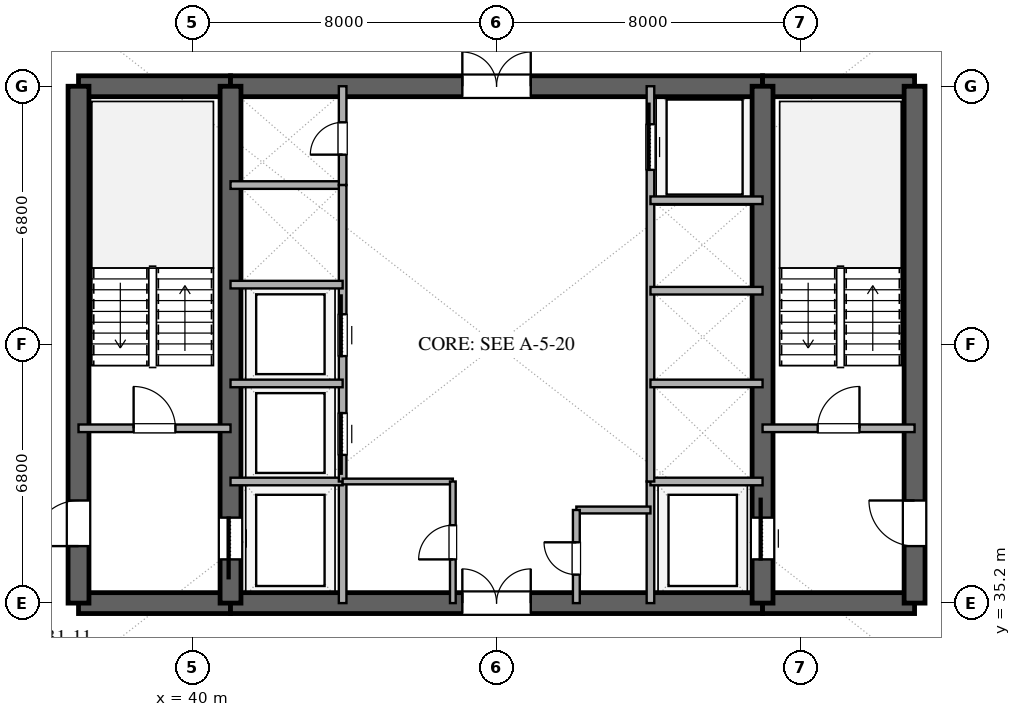
"""IFC4 building model, lengths in metres.
Left out: names, types, materials, properties, quantities, classifications, styles, units other than length and angle.
Written with IfcOpenShell. Run it as: python <this file> out.ifc"""

import sys

from ifc_helpers import new_model, si_unit, direction, frame, frame_2d, origin, place, context, subcontext, project, spatial, rectangle, extrude, element, fill, save


model = new_model("IFC4")
c1 = context("Model", 3, precision=1e-05, world=origin(), true_north=direction((0.0, 1.0)))
c2 = subcontext(c1, "Body", "Model", "MODEL_VIEW")
j1 = project(units=[si_unit("LENGTHUNIT", "METRE"), si_unit("PLANEANGLEUNIT", "RADIAN")], contexts=[c1])
p1 = place(None, origin())
s1 = spatial("IfcSite", under=j1, at=p1, CompositionType="ELEMENT")
p2 = place(p1, origin())
s2 = spatial("IfcBuilding", under=s1, at=p2, CompositionType="ELEMENT")
p3 = place(p2, frame((0.0, 0.0, 123.6)))
s3 = spatial("IfcBuildingStorey", under=s2, at=p3, CompositionType="ELEMENT", Elevation=123.6)
p4 = place(p3, frame((37.0, 35.2, 0.0), z_axis=(0.0, 0.0, 1.0), x_axis=(1.0, 0.0, 0.0)))
e1 = element("IfcWall", 1, at=p4, inside=s3, PredefinedType="SHEAR", context=c2, shape_type="SweptSolid", body=[
    extrude(rectangle(XDim=4.0, YDim=0.55, at=frame_2d((2.0, 0.0))), origin(), (0.0, 0.0, 1.0), 3.38),
])
p5 = place(p3, frame((41.0, 35.2, 0.0), z_axis=(0.0, 0.0, 1.0), x_axis=(1.0, 0.0, 0.0)))
e2 = element("IfcWall", 2, at=p5, inside=s3, PredefinedType="SHEAR", context=c2, shape_type="SweptSolid", body=[
    extrude(rectangle(XDim=14.0, YDim=0.55, at=frame_2d((7.0, 0.0))), origin(), (0.0, 0.0, 1.0), 3.38),
])
p6 = place(p5, frame((6.1, 0.0, 0.0)))
e3 = element("IfcOpeningElement", 3, at=p6, cuts=e2, PredefinedType="OPENING", context=c2, shape_type="SweptSolid", body=[
    extrude(rectangle(XDim=1.8, YDim=2.25, at=frame_2d((0.9, 1.125))), frame((0.0, 0.285, 0.0), z_axis=(0.0, -1.0, 0.0), x_axis=(1.0, 0.0, 0.0)), (0.0, 0.0, 1.0), 0.57),
])
for number, where, z_axis, x_axis in (
    (4, (55.0, 35.2, 0.0), (0.0, 0.0, 1.0), (1.0, 0.0, 0.0)),
    (5, (37.0, 48.8, 0.0), (0.0, 0.0, 1.0), (1.0, 0.0, 0.0)),
):
    element("IfcWall", number, at=place(p3, frame(where, z_axis=z_axis, x_axis=x_axis)), inside=s3, PredefinedType="SHEAR", context=c2, shape_type="SweptSolid", body=[
        extrude(rectangle(XDim=4.0, YDim=0.55, at=frame_2d((2.0, 0.0))), origin(), (0.0, 0.0, 1.0), 3.38),
    ])
p7 = place(p3, frame((41.0, 48.8, 0.0), z_axis=(0.0, 0.0, 1.0), x_axis=(1.0, 0.0, 0.0)))
e6 = element("IfcWall", 6, at=p7, inside=s3, PredefinedType="SHEAR", context=c2, shape_type="SweptSolid", body=[
    extrude(rectangle(XDim=14.0, YDim=0.55, at=frame_2d((7.0, 0.0))), origin(), (0.0, 0.0, 1.0), 3.38),
])
p8 = place(p7, frame((6.1, 0.0, 0.0)))
e7 = element("IfcOpeningElement", 7, at=p8, cuts=e6, PredefinedType="OPENING", context=c2, shape_type="SweptSolid", body=[
    extrude(rectangle(XDim=1.8, YDim=2.25, at=frame_2d((0.9, 1.125))), frame((0.0, 0.285, 0.0), z_axis=(0.0, -1.0, 0.0), x_axis=(1.0, 0.0, 0.0)), (0.0, 0.0, 1.0), 0.57),
])
p9 = place(p3, frame((55.0, 48.8, 0.0), z_axis=(0.0, 0.0, 1.0), x_axis=(1.0, 0.0, 0.0)))
e8 = element("IfcWall", 8, at=p9, inside=s3, PredefinedType="SHEAR", context=c2, shape_type="SweptSolid", body=[
    extrude(rectangle(XDim=4.0, YDim=0.55, at=frame_2d((2.0, 0.0))), origin(), (0.0, 0.0, 1.0), 3.38),
])
p10 = place(p3, frame((37.0, 35.2, 0.0), z_axis=(0.0, 0.0, 1.0), x_axis=(0.0, 1.0, 0.0)))
e9 = element("IfcWall", 9, at=p10, inside=s3, PredefinedType="SHEAR", context=c2, shape_type="SweptSolid", body=[
    extrude(rectangle(XDim=13.6, YDim=0.55, at=frame_2d((6.8, 0.0))), origin(), (0.0, 0.0, 1.0), 3.38),
])
p11 = place(p10, frame((1.5, 0.0, 0.0)))
e10 = element("IfcOpeningElement", 10, at=p11, cuts=e9, PredefinedType="OPENING", context=c2, shape_type="SweptSolid", body=[
    extrude(rectangle(XDim=1.2, YDim=2.15, at=frame_2d((0.6, 1.075))), frame((0.0, 0.285, 0.0), z_axis=(0.0, -1.0, 0.0), x_axis=(1.0, 0.0, 0.0)), (0.0, 0.0, 1.0), 0.57),
])
p12 = place(p3, frame((59.0, 35.2, 0.0), z_axis=(0.0, 0.0, 1.0), x_axis=(0.0, 1.0, 0.0)))
e11 = element("IfcWall", 11, at=p12, inside=s3, PredefinedType="SHEAR", context=c2, shape_type="SweptSolid", body=[
    extrude(rectangle(XDim=13.6, YDim=0.55, at=frame_2d((6.8, 0.0))), origin(), (0.0, 0.0, 1.0), 3.38),
])
p13 = place(p12, frame((1.5, 0.0, 0.0)))
e12 = element("IfcOpeningElement", 12, at=p13, cuts=e11, PredefinedType="OPENING", context=c2, shape_type="SweptSolid", body=[
    extrude(rectangle(XDim=1.2, YDim=2.15, at=frame_2d((0.6, 1.075))), frame((0.0, 0.285, 0.0), z_axis=(0.0, -1.0, 0.0), x_axis=(1.0, 0.0, 0.0)), (0.0, 0.0, 1.0), 0.57),
])
p14 = place(p3, frame((41.0, 35.2, 0.0), z_axis=(0.0, 0.0, 1.0), x_axis=(0.0, 1.0, 0.0)))
e13 = element("IfcWall", 13, at=p14, inside=s3, PredefinedType="SHEAR", context=c2, shape_type="SweptSolid", body=[
    extrude(rectangle(XDim=13.6, YDim=0.55, at=frame_2d((6.8, 0.0))), origin(), (0.0, 0.0, 1.0), 3.38),
])
p15 = place(p14, frame((1.15, 0.0, 0.0)))
e14 = element("IfcOpeningElement", 14, at=p15, cuts=e13, PredefinedType="OPENING", context=c2, shape_type="SweptSolid", body=[
    extrude(rectangle(XDim=1.1, YDim=2.2, at=frame_2d((0.55, 1.1))), frame((0.0, 0.285, 0.0), z_axis=(0.0, -1.0, 0.0), x_axis=(1.0, 0.0, 0.0)), (0.0, 0.0, 1.0), 0.57),
])
p16 = place(p3, frame((55.0, 35.2, 0.0), z_axis=(0.0, 0.0, 1.0), x_axis=(0.0, 1.0, 0.0)))
e15 = element("IfcWall", 15, at=p16, inside=s3, PredefinedType="SHEAR", context=c2, shape_type="SweptSolid", body=[
    extrude(rectangle(XDim=13.6, YDim=0.55, at=frame_2d((6.8, 0.0))), origin(), (0.0, 0.0, 1.0), 3.38),
])
p17 = place(p16, frame((1.15, 0.0, 0.0)))
e16 = element("IfcOpeningElement", 16, at=p17, cuts=e15, PredefinedType="OPENING", context=c2, shape_type="SweptSolid", body=[
    extrude(rectangle(XDim=1.1, YDim=2.2, at=frame_2d((0.55, 1.1))), frame((0.0, 0.285, 0.0), z_axis=(0.0, -1.0, 0.0), x_axis=(1.0, 0.0, 0.0)), (0.0, 0.0, 1.0), 0.57),
])
p18 = place(p3, frame((37.0, 39.8, 0.0), z_axis=(0.0, 0.0, 1.0), x_axis=(1.0, 0.0, 0.0)))
e17 = element("IfcWall", 17, at=p18, inside=s3, PredefinedType="SOLIDWALL", context=c2, shape_type="SweptSolid", body=[
    extrude(rectangle(XDim=4.0, YDim=0.2, at=frame_2d((2.0, 0.0))), origin(), (0.0, 0.0, 1.0), 2.74),
])
p19 = place(p18, frame((1.45, 0.0, 0.0)))
e18 = element("IfcOpeningElement", 18, at=p19, cuts=e17, PredefinedType="OPENING", context=c2, shape_type="SweptSolid", body=[
    extrude(rectangle(XDim=1.1, YDim=2.15, at=frame_2d((0.55, 1.075))), frame((0.0, 0.11, 0.0), z_axis=(0.0, -1.0, 0.0), x_axis=(1.0, 0.0, 0.0)), (0.0, 0.0, 1.0), 0.22),
])
p20 = place(p3, frame((55.0, 39.8, 0.0), z_axis=(0.0, 0.0, 1.0), x_axis=(1.0, 0.0, 0.0)))
e19 = element("IfcWall", 19, at=p20, inside=s3, PredefinedType="SOLIDWALL", context=c2, shape_type="SweptSolid", body=[
    extrude(rectangle(XDim=4.0, YDim=0.2, at=frame_2d((2.0, 0.0))), origin(), (0.0, 0.0, 1.0), 2.74),
])
p21 = place(p20, frame((1.45, 0.0, 0.0)))
e20 = element("IfcOpeningElement", 20, at=p21, cuts=e19, PredefinedType="OPENING", context=c2, shape_type="SweptSolid", body=[
    extrude(rectangle(XDim=1.1, YDim=2.15, at=frame_2d((0.55, 1.075))), frame((0.0, 0.11, 0.0), z_axis=(0.0, -1.0, 0.0), x_axis=(1.0, 0.0, 0.0)), (0.0, 0.0, 1.0), 0.22),
])
p22 = place(p3, frame((43.95, 35.2, 0.0), z_axis=(0.0, 0.0, 1.0), x_axis=(0.0, 1.0, 0.0)))
e21 = element("IfcWall", 21, at=p22, inside=s3, PredefinedType="SOLIDWALL", context=c2, shape_type="SweptSolid", body=[
    extrude(rectangle(XDim=3.2, YDim=0.2, at=frame_2d((1.6, 0.0))), origin(), (0.0, 0.0, 1.0), 2.74),
])
p23 = place(p3, frame((41.0, 38.4, 0.0), z_axis=(0.0, 0.0, 1.0), x_axis=(1.0, 0.0, 0.0)))
e22 = element("IfcWall", 22, at=p23, inside=s3, PredefinedType="SOLIDWALL", context=c2, shape_type="SweptSolid", body=[
    extrude(rectangle(XDim=2.95, YDim=0.2, at=frame_2d((1.475, 0.0))), origin(), (0.0, 0.0, 1.0), 2.74),
])
p24 = place(p3, frame((52.05, 35.2, 0.0), z_axis=(0.0, 0.0, 1.0), x_axis=(0.0, 1.0, 0.0)))
e23 = element("IfcWall", 23, at=p24, inside=s3, PredefinedType="SOLIDWALL", context=c2, shape_type="SweptSolid", body=[
    extrude(rectangle(XDim=3.2, YDim=0.2, at=frame_2d((1.6, 0.0))), origin(), (0.0, 0.0, 1.0), 2.74),
])
for number, where, z_axis, x_axis in (
    (24, (52.05, 38.4, 0.0), (0.0, 0.0, 1.0), (1.0, 0.0, 0.0)),
    (25, (41.0, 46.2, 0.0), (0.0, 0.0, 1.0), (1.0, 0.0, 0.0)),
):
    element("IfcWall", number, at=place(p3, frame(where, z_axis=z_axis, x_axis=x_axis)), inside=s3, PredefinedType="SOLIDWALL", context=c2, shape_type="SweptSolid", body=[
        extrude(rectangle(XDim=2.95, YDim=0.2, at=frame_2d((1.475, 0.0))), origin(), (0.0, 0.0, 1.0), 2.74),
    ])
p25 = place(p3, frame((43.95, 46.2, 0.0), z_axis=(0.0, 0.0, 1.0), x_axis=(0.0, 1.0, 0.0)))
e26 = element("IfcWall", 26, at=p25, inside=s3, PredefinedType="SOLIDWALL", context=c2, shape_type="SweptSolid", body=[
    extrude(rectangle(XDim=2.6, YDim=0.2, at=frame_2d((1.3, 0.0))), origin(), (0.0, 0.0, 1.0), 2.74),
])
p26 = place(p25, frame((0.8, 0.0, 0.0)))
e27 = element("IfcOpeningElement", 27, at=p26, cuts=e26, PredefinedType="OPENING", context=c2, shape_type="SweptSolid", body=[
    extrude(rectangle(XDim=0.85, YDim=2.15, at=frame_2d((0.425, 1.075))), frame((0.0, 0.11, 0.0), z_axis=(0.0, -1.0, 0.0), x_axis=(1.0, 0.0, 0.0)), (0.0, 0.0, 1.0), 0.22),
])
p27 = place(p3, frame((43.95, 38.4, 0.0), z_axis=(0.0, 0.0, 1.0), x_axis=(0.0, 1.0, 0.0)))
e28 = element("IfcWall", 28, at=p27, inside=s3, PredefinedType="SOLIDWALL", context=c2, shape_type="SweptSolid", body=[
    extrude(rectangle(XDim=7.8, YDim=0.2, at=frame_2d((3.9, 0.0))), origin(), (0.0, 0.0, 1.0), 2.74),
])
p28 = place(p27, frame((0.7, 0.0, 0.0)))
e29 = element("IfcOpeningElement", 29, at=p28, cuts=e28, PredefinedType="OPENING", context=c2, shape_type="SweptSolid", body=[
    extrude(rectangle(XDim=1.1, YDim=2.2, at=frame_2d((0.55, 1.1))), frame((0.0, 0.11, 0.0), z_axis=(0.0, -1.0, 0.0), x_axis=(1.0, 0.0, 0.0)), (0.0, 0.0, 1.0), 0.22),
])
p29 = place(p27, frame((3.3, 0.0, 0.0)))
e30 = element("IfcOpeningElement", 30, at=p29, cuts=e28, PredefinedType="OPENING", context=c2, shape_type="SweptSolid", body=[
    extrude(rectangle(XDim=1.1, YDim=2.2, at=frame_2d((0.55, 1.1))), frame((0.0, 0.11, 0.0), z_axis=(0.0, -1.0, 0.0), x_axis=(1.0, 0.0, 0.0)), (0.0, 0.0, 1.0), 0.22),
])
for number, where, z_axis, x_axis in (
    (31, (41.0, 40.98, 0.0), (0.0, 0.0, 1.0), (1.0, 0.0, 0.0)),
    (32, (41.0, 43.58, 0.0), (0.0, 0.0, 1.0), (1.0, 0.0, 0.0)),
):
    element("IfcWall", number, at=place(p3, frame(where, z_axis=z_axis, x_axis=x_axis)), inside=s3, PredefinedType="SOLIDWALL", context=c2, shape_type="SweptSolid", body=[
        extrude(rectangle(XDim=2.95, YDim=0.2, at=frame_2d((1.475, 0.0))), origin(), (0.0, 0.0, 1.0), 2.74),
    ])
p30 = place(p3, frame((52.05, 38.4, 0.0), z_axis=(0.0, 0.0, 1.0), x_axis=(0.0, 1.0, 0.0)))
e33 = element("IfcWall", 33, at=p30, inside=s3, PredefinedType="SOLIDWALL", context=c2, shape_type="SweptSolid", body=[
    extrude(rectangle(XDim=10.4, YDim=0.2, at=frame_2d((5.2, 0.0))), origin(), (0.0, 0.0, 1.0), 2.74),
])
p31 = place(p30, frame((8.2, 0.0, 0.0)))
e34 = element("IfcOpeningElement", 34, at=p31, cuts=e33, PredefinedType="OPENING", context=c2, shape_type="SweptSolid", body=[
    extrude(rectangle(XDim=1.2, YDim=2.2, at=frame_2d((0.6, 1.1))), frame((0.0, 0.11, 0.0), z_axis=(0.0, -1.0, 0.0), x_axis=(1.0, 0.0, 0.0)), (0.0, 0.0, 1.0), 0.22),
])
for number, where, z_axis, x_axis in (
    (35, (52.05, 40.98, 0.0), (0.0, 0.0, 1.0), (1.0, 0.0, 0.0)),
    (36, (52.05, 43.42, 0.0), (0.0, 0.0, 1.0), (1.0, 0.0, 0.0)),
    (37, (52.05, 45.8, 0.0), (0.0, 0.0, 1.0), (1.0, 0.0, 0.0)),
):
    element("IfcWall", number, at=place(p3, frame(where, z_axis=z_axis, x_axis=x_axis)), inside=s3, PredefinedType="SOLIDWALL", context=c2, shape_type="SweptSolid", body=[
        extrude(rectangle(XDim=2.95, YDim=0.2, at=frame_2d((1.475, 0.0))), origin(), (0.0, 0.0, 1.0), 2.74),
    ])
p32 = place(p3, frame((43.95, 38.4, 0.0), z_axis=(0.0, 0.0, 1.0), x_axis=(1.0, 0.0, 0.0)))
e38 = element("IfcWall", 38, at=p32, inside=s3, PredefinedType="PARTITIONING", context=c2, shape_type="SweptSolid", body=[
    extrude(rectangle(XDim=2.9, YDim=0.15, at=frame_2d((1.45, 0.0))), origin(), (0.0, 0.0, 1.0), 2.74),
])
p33 = place(p3, frame((46.85, 35.2, 0.0), z_axis=(0.0, 0.0, 1.0), x_axis=(0.0, 1.0, 0.0)))
e39 = element("IfcWall", 39, at=p33, inside=s3, PredefinedType="PARTITIONING", context=c2, shape_type="SweptSolid", body=[
    extrude(rectangle(XDim=3.2, YDim=0.15, at=frame_2d((1.6, 0.0))), origin(), (0.0, 0.0, 1.0), 2.74),
])
p34 = place(p33, frame((1.15, 0.0, 0.0)))
e40 = element("IfcOpeningElement", 40, at=p34, cuts=e39, PredefinedType="OPENING", context=c2, shape_type="SweptSolid", body=[
    extrude(rectangle(XDim=0.9, YDim=2.15, at=frame_2d((0.45, 1.075))), frame((0.0, 0.085, 0.0), z_axis=(0.0, -1.0, 0.0), x_axis=(1.0, 0.0, 0.0)), (0.0, 0.0, 1.0), 0.17),
])
p35 = place(p3, frame((50.1, 37.65, 0.0), z_axis=(0.0, 0.0, 1.0), x_axis=(1.0, 0.0, 0.0)))
e41 = element("IfcWall", 41, at=p35, inside=s3, PredefinedType="PLUMBINGWALL", context=c2, shape_type="SweptSolid", body=[
    extrude(rectangle(XDim=1.95, YDim=0.18, at=frame_2d((0.975, 0.0))), origin(), (0.0, 0.0, 1.0), 2.74),
])
p36 = place(p3, frame((50.1, 35.2, 0.0), z_axis=(0.0, 0.0, 1.0), x_axis=(0.0, 1.0, 0.0)))
e42 = element("IfcWall", 42, at=p36, inside=s3, PredefinedType="PLUMBINGWALL", context=c2, shape_type="SweptSolid", body=[
    extrude(rectangle(XDim=2.45, YDim=0.18, at=frame_2d((1.225, 0.0))), origin(), (0.0, 0.0, 1.0), 2.74),
])
p37 = place(p36, frame((0.75, 0.0, 0.0)))
e43 = element("IfcOpeningElement", 43, at=p37, cuts=e42, PredefinedType="OPENING", context=c2, shape_type="SweptSolid", body=[
    extrude(rectangle(XDim=0.85, YDim=2.1, at=frame_2d((0.425, 1.05))), frame((0.0, 0.1, 0.0), z_axis=(0.0, -1.0, 0.0), x_axis=(1.0, 0.0, 0.0)), (0.0, 0.0, 1.0), 0.2),
])
p38 = place(p15, origin())
e44 = element("IfcDoor", 44, at=p38, inside=s3, OperationType="SLIDING_TO_LEFT", PredefinedType="DOOR", context=c2, shape_type="SweptSolid", body=[
    extrude(rectangle(XDim=1.1, YDim=2.2, at=frame_2d((0.55, 1.1))), frame((0.0, 0.025, 0.0), z_axis=(0.0, -1.0, 0.0), x_axis=(1.0, 0.0, 0.0)), (0.0, 0.0, 1.0), 0.05),
])
fill(e14, e44)
p39 = place(p17, origin())
e45 = element("IfcDoor", 45, at=p39, inside=s3, OperationType="SLIDING_TO_RIGHT", PredefinedType="DOOR", context=c2, shape_type="SweptSolid", body=[
    extrude(rectangle(XDim=1.1, YDim=2.2, at=frame_2d((0.55, 1.1))), frame((0.0, 0.025, 0.0), z_axis=(0.0, -1.0, 0.0), x_axis=(1.0, 0.0, 0.0)), (0.0, 0.0, 1.0), 0.05),
])
fill(e16, e45)
p40 = place(p11, origin())
e46 = element("IfcDoor", 46, at=p40, inside=s3, OperationType="SINGLE_SWING_LEFT", PredefinedType="DOOR", context=c2, shape_type="SweptSolid", body=[
    extrude(rectangle(XDim=1.2, YDim=2.15, at=frame_2d((0.6, 1.075))), frame((0.0, 0.025, 0.0), z_axis=(0.0, -1.0, 0.0), x_axis=(1.0, 0.0, 0.0)), (0.0, 0.0, 1.0), 0.05),
])
fill(e10, e46)
p41 = place(p13, origin())
e47 = element("IfcDoor", 47, at=p41, inside=s3, OperationType="SINGLE_SWING_RIGHT", PredefinedType="DOOR", context=c2, shape_type="SweptSolid", body=[
    extrude(rectangle(XDim=1.2, YDim=2.15, at=frame_2d((0.6, 1.075))), frame((0.0, 0.025, 0.0), z_axis=(0.0, -1.0, 0.0), x_axis=(1.0, 0.0, 0.0)), (0.0, 0.0, 1.0), 0.05),
])
fill(e12, e47)
p42 = place(p6, origin())
e48 = element("IfcDoor", 48, at=p42, inside=s3, OperationType="DOUBLE_DOOR_SINGLE_SWING", PredefinedType="DOOR", context=c2, shape_type="SweptSolid", body=[
    extrude(rectangle(XDim=1.8, YDim=2.25, at=frame_2d((0.9, 1.125))), frame((0.0, 0.025, 0.0), z_axis=(0.0, -1.0, 0.0), x_axis=(1.0, 0.0, 0.0)), (0.0, 0.0, 1.0), 0.05),
])
fill(e3, e48)
p43 = place(p8, origin())
e49 = element("IfcDoor", 49, at=p43, inside=s3, OperationType="DOUBLE_DOOR_SINGLE_SWING", PredefinedType="DOOR", context=c2, shape_type="SweptSolid", body=[
    extrude(rectangle(XDim=1.8, YDim=2.25, at=frame_2d((0.9, 1.125))), frame((0.0, 0.025, 0.0), z_axis=(0.0, -1.0, 0.0), x_axis=(1.0, 0.0, 0.0)), (0.0, 0.0, 1.0), 0.05),
])
fill(e7, e49)
p44 = place(p19, origin())
e50 = element("IfcDoor", 50, at=p44, inside=s3, OperationType="SINGLE_SWING_LEFT", PredefinedType="DOOR", context=c2, shape_type="SweptSolid", body=[
    extrude(rectangle(XDim=1.1, YDim=2.15, at=frame_2d((0.55, 1.075))), frame((0.0, 0.025, 0.0), z_axis=(0.0, -1.0, 0.0), x_axis=(1.0, 0.0, 0.0)), (0.0, 0.0, 1.0), 0.05),
])
fill(e18, e50)
p45 = place(p21, origin())
e51 = element("IfcDoor", 51, at=p45, inside=s3, OperationType="SINGLE_SWING_RIGHT", PredefinedType="DOOR", context=c2, shape_type="SweptSolid", body=[
    extrude(rectangle(XDim=1.1, YDim=2.15, at=frame_2d((0.55, 1.075))), frame((0.0, 0.025, 0.0), z_axis=(0.0, -1.0, 0.0), x_axis=(1.0, 0.0, 0.0)), (0.0, 0.0, 1.0), 0.05),
])
fill(e20, e51)
p46 = place(p26, origin())
e52 = element("IfcDoor", 52, at=p46, inside=s3, OperationType="SINGLE_SWING_LEFT", PredefinedType="DOOR", context=c2, shape_type="SweptSolid", body=[
    extrude(rectangle(XDim=0.85, YDim=2.15, at=frame_2d((0.425, 1.075))), frame((0.0, 0.025, 0.0), z_axis=(0.0, -1.0, 0.0), x_axis=(1.0, 0.0, 0.0)), (0.0, 0.0, 1.0), 0.05),
])
fill(e27, e52)
p47 = place(p28, origin())
e53 = element("IfcDoor", 53, at=p47, inside=s3, OperationType="SLIDING_TO_LEFT", PredefinedType="DOOR", context=c2, shape_type="SweptSolid", body=[
    extrude(rectangle(XDim=1.1, YDim=2.2, at=frame_2d((0.55, 1.1))), frame((0.0, 0.025, 0.0), z_axis=(0.0, -1.0, 0.0), x_axis=(1.0, 0.0, 0.0)), (0.0, 0.0, 1.0), 0.05),
])
fill(e29, e53)
p48 = place(p29, origin())
e54 = element("IfcDoor", 54, at=p48, inside=s3, OperationType="SLIDING_TO_RIGHT", PredefinedType="DOOR", context=c2, shape_type="SweptSolid", body=[
    extrude(rectangle(XDim=1.1, YDim=2.2, at=frame_2d((0.55, 1.1))), frame((0.0, 0.025, 0.0), z_axis=(0.0, -1.0, 0.0), x_axis=(1.0, 0.0, 0.0)), (0.0, 0.0, 1.0), 0.05),
])
fill(e30, e54)
p49 = place(p31, origin())
e55 = element("IfcDoor", 55, at=p49, inside=s3, OperationType="SLIDING_TO_RIGHT", PredefinedType="DOOR", context=c2, shape_type="SweptSolid", body=[
    extrude(rectangle(XDim=1.2, YDim=2.2, at=frame_2d((0.6, 1.1))), frame((0.0, 0.025, 0.0), z_axis=(0.0, -1.0, 0.0), x_axis=(1.0, 0.0, 0.0)), (0.0, 0.0, 1.0), 0.05),
])
fill(e34, e55)
p50 = place(p34, origin())
e56 = element("IfcDoor", 56, at=p50, inside=s3, OperationType="SINGLE_SWING_LEFT", PredefinedType="DOOR", context=c2, shape_type="SweptSolid", body=[
    extrude(rectangle(XDim=0.9, YDim=2.15, at=frame_2d((0.45, 1.075))), frame((0.0, 0.025, 0.0), z_axis=(0.0, -1.0, 0.0), x_axis=(1.0, 0.0, 0.0)), (0.0, 0.0, 1.0), 0.05),
])
fill(e40, e56)
p51 = place(p37, origin())
e57 = element("IfcDoor", 57, at=p51, inside=s3, OperationType="SINGLE_SWING_RIGHT", PredefinedType="DOOR", context=c2, shape_type="SweptSolid", body=[
    extrude(rectangle(XDim=0.85, YDim=2.1, at=frame_2d((0.425, 1.05))), frame((0.0, 0.025, 0.0), z_axis=(0.0, -1.0, 0.0), x_axis=(1.0, 0.0, 0.0)), (0.0, 0.0, 1.0), 0.05),
])
fill(e43, e57)
save(model, sys.argv[1])
